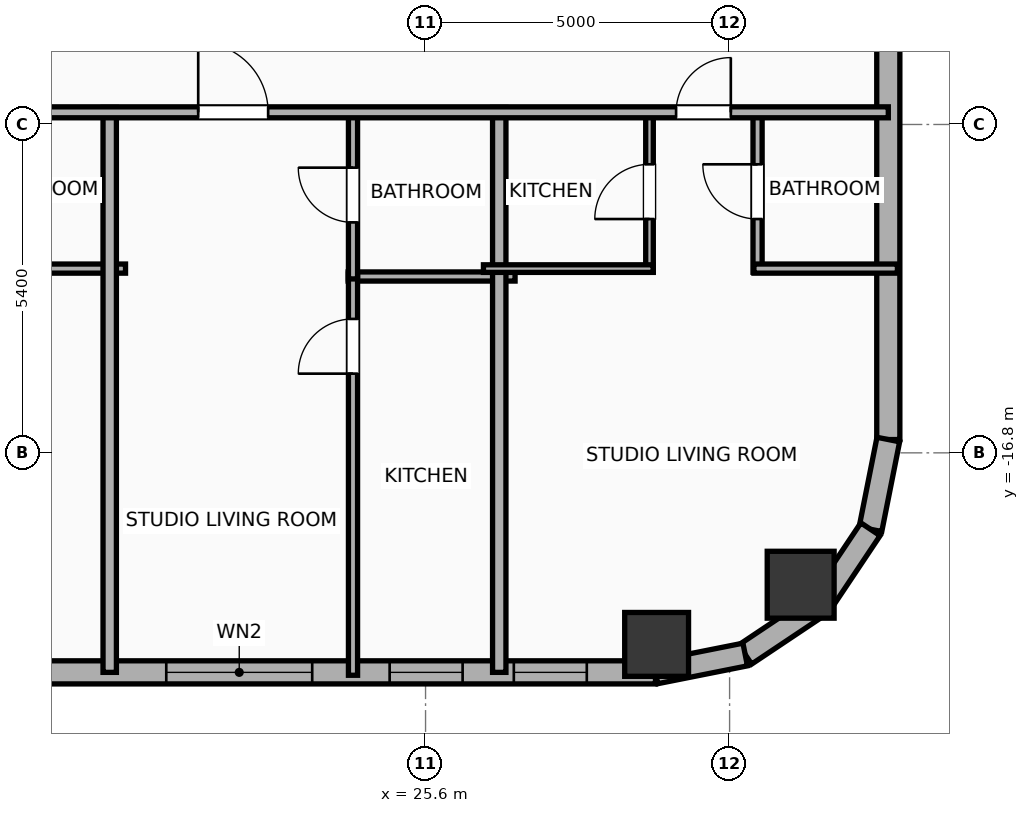
"""IFC4 building model, lengths in metres.
Left out: names, types, materials, properties, quantities, classifications, styles, units other than length and angle.
Written with IfcOpenShell. Run it as: python <this file> out.ifc"""

import sys

from ifc_helpers import new_model, si_unit, direction, frame, frame_2d, origin, origin_2d, place, context, subcontext, project, spatial, rectangle, hollow_rectangle, hollow_circle, extrude, element, fill, save


model = new_model("IFC4")
c1 = context("Model", 3, precision=1e-05, world=origin(), true_north=direction((0.0, 1.0)))
c2 = subcontext(c1, "Body", "Model", "MODEL_VIEW")
j1 = project(units=[si_unit("LENGTHUNIT", "METRE"), si_unit("PLANEANGLEUNIT", "RADIAN")], contexts=[c1])
p1 = place(None, origin())
s1 = spatial("IfcSite", under=j1, at=p1, CompositionType="ELEMENT")
p2 = place(p1, origin())
s2 = spatial("IfcBuilding", under=s1, at=p2, CompositionType="ELEMENT")
p3 = place(p2, frame((0.0, 0.0, 120.9)))
s3 = spatial("IfcBuildingStorey", under=s2, at=p3, CompositionType="ELEMENT", Elevation=120.9)
p4 = place(p3, frame((29.4, -19.95, 0.0), z_axis=(0.0, 0.0, 1.0), x_axis=(1.0, 0.0, 0.0)))
e1 = element("IfcColumn", 1, at=p4, inside=s3, PredefinedType="COLUMN", context=c2, shape_type="SweptSolid", body=[
    extrude(hollow_rectangle(XDim=1.05, YDim=1.05, WallThickness=0.036, at=origin_2d()), origin(), (0.0, 0.0, 1.0), 3.9),
])
p5 = place(p3, frame((31.769, -18.969, 0.0), z_axis=(0.0, 0.0, 1.0), x_axis=(1.0, 0.0, 0.0)))
e2 = element("IfcColumn", 2, at=p5, inside=s3, PredefinedType="COLUMN", context=c2, shape_type="SweptSolid", body=[
    extrude(hollow_circle(Radius=0.55, WallThickness=0.036, at=origin_2d()), origin(), (0.0, 0.0, 1.0), 3.9),
])
p6 = place(p3, frame((29.381, -20.41, 0.0), z_axis=(0.0, 0.0, 1.0), x_axis=(-1.0, 0.0, 0.0)))
e3 = element("IfcWall", 3, at=p6, inside=s3, PredefinedType="ELEMENTEDWALL", context=c2, shape_type="SweptSolid", body=[
    extrude(rectangle(XDim=54.763, YDim=0.38, at=frame_2d((27.381, 0.0))), origin(), (0.0, 0.0, 1.0), 3.65),
])
p7 = place(p6, frame((5.645, 0.0, 0.75)))
e4 = element("IfcOpeningElement", 4, at=p7, cuts=e3, PredefinedType="OPENING", context=c2, shape_type="SweptSolid", body=[
    extrude(rectangle(XDim=2.4, YDim=2.1, at=frame_2d((1.2, 1.05))), frame((0.0, 0.2, 0.0), z_axis=(0.0, -1.0, 0.0), x_axis=(1.0, 0.0, 0.0)), (0.0, 0.0, 1.0), 0.4),
])
p8 = place(p6, frame((47.567, 0.0, 0.75)))
e5 = element("IfcOpeningElement", 5, at=p8, cuts=e3, PredefinedType="OPENING", context=c2, shape_type="SweptSolid", body=[
    extrude(rectangle(XDim=2.4, YDim=2.1, at=frame_2d((1.2, 1.05))), frame((0.0, 0.2, 0.0), z_axis=(0.0, -1.0, 0.0), x_axis=(1.0, 0.0, 0.0)), (0.0, 0.0, 1.0), 0.4),
])
p9 = place(p6, frame((51.831, 0.0, 0.75)))
e6 = element("IfcOpeningElement", 6, at=p9, cuts=e3, PredefinedType="OPENING", context=c2, shape_type="SweptSolid", body=[
    extrude(rectangle(XDim=1.2, YDim=2.05, at=frame_2d((0.6, 1.025))), frame((0.0, 0.2, 0.0), z_axis=(0.0, -1.0, 0.0), x_axis=(1.0, 0.0, 0.0)), (0.0, 0.0, 1.0), 0.4),
])
p10 = place(p6, frame((44.606, 0.0, 0.75)))
e7 = element("IfcOpeningElement", 7, at=p10, cuts=e3, PredefinedType="OPENING", context=c2, shape_type="SweptSolid", body=[
    extrude(rectangle(XDim=1.2, YDim=2.05, at=frame_2d((0.6, 1.025))), frame((0.0, 0.2, 0.0), z_axis=(0.0, -1.0, 0.0), x_axis=(1.0, 0.0, 0.0)), (0.0, 0.0, 1.0), 0.4),
])
p11 = place(p6, frame((40.986, 0.0, 0.75)))
e8 = element("IfcOpeningElement", 8, at=p11, cuts=e3, PredefinedType="OPENING", context=c2, shape_type="SweptSolid", body=[
    extrude(rectangle(XDim=1.2, YDim=2.05, at=frame_2d((0.6, 1.025))), frame((0.0, 0.2, 0.0), z_axis=(0.0, -1.0, 0.0), x_axis=(1.0, 0.0, 0.0)), (0.0, 0.0, 1.0), 0.4),
])
p12 = place(p6, frame((37.486, 0.0, 0.75)))
e9 = element("IfcOpeningElement", 9, at=p12, cuts=e3, PredefinedType="OPENING", context=c2, shape_type="SweptSolid", body=[
    extrude(rectangle(XDim=1.2, YDim=2.05, at=frame_2d((0.6, 1.025))), frame((0.0, 0.2, 0.0), z_axis=(0.0, -1.0, 0.0), x_axis=(1.0, 0.0, 0.0)), (0.0, 0.0, 1.0), 0.4),
])
p13 = place(p6, frame((33.986, 0.0, 0.75)))
e10 = element("IfcOpeningElement", 10, at=p13, cuts=e3, PredefinedType="OPENING", context=c2, shape_type="SweptSolid", body=[
    extrude(rectangle(XDim=1.2, YDim=2.05, at=frame_2d((0.6, 1.025))), frame((0.0, 0.2, 0.0), z_axis=(0.0, -1.0, 0.0), x_axis=(1.0, 0.0, 0.0)), (0.0, 0.0, 1.0), 0.4),
])
p14 = place(p6, frame((30.486, 0.0, 0.75)))
e11 = element("IfcOpeningElement", 11, at=p14, cuts=e3, PredefinedType="OPENING", context=c2, shape_type="SweptSolid", body=[
    extrude(rectangle(XDim=1.2, YDim=2.05, at=frame_2d((0.6, 1.025))), frame((0.0, 0.2, 0.0), z_axis=(0.0, -1.0, 0.0), x_axis=(1.0, 0.0, 0.0)), (0.0, 0.0, 1.0), 0.4),
])
p15 = place(p6, frame((26.986, 0.0, 0.75)))
e12 = element("IfcOpeningElement", 12, at=p15, cuts=e3, PredefinedType="OPENING", context=c2, shape_type="SweptSolid", body=[
    extrude(rectangle(XDim=1.2, YDim=2.05, at=frame_2d((0.6, 1.025))), frame((0.0, 0.2, 0.0), z_axis=(0.0, -1.0, 0.0), x_axis=(1.0, 0.0, 0.0)), (0.0, 0.0, 1.0), 0.4),
])
p16 = place(p6, frame((23.486, 0.0, 0.75)))
e13 = element("IfcOpeningElement", 13, at=p16, cuts=e3, PredefinedType="OPENING", context=c2, shape_type="SweptSolid", body=[
    extrude(rectangle(XDim=1.2, YDim=2.05, at=frame_2d((0.6, 1.025))), frame((0.0, 0.2, 0.0), z_axis=(0.0, -1.0, 0.0), x_axis=(1.0, 0.0, 0.0)), (0.0, 0.0, 1.0), 0.4),
])
p17 = place(p6, frame((19.986, 0.0, 0.75)))
e14 = element("IfcOpeningElement", 14, at=p17, cuts=e3, PredefinedType="OPENING", context=c2, shape_type="SweptSolid", body=[
    extrude(rectangle(XDim=1.2, YDim=2.05, at=frame_2d((0.6, 1.025))), frame((0.0, 0.2, 0.0), z_axis=(0.0, -1.0, 0.0), x_axis=(1.0, 0.0, 0.0)), (0.0, 0.0, 1.0), 0.4),
])
p18 = place(p6, frame((16.486, 0.0, 0.75)))
e15 = element("IfcOpeningElement", 15, at=p18, cuts=e3, PredefinedType="OPENING", context=c2, shape_type="SweptSolid", body=[
    extrude(rectangle(XDim=1.2, YDim=2.05, at=frame_2d((0.6, 1.025))), frame((0.0, 0.2, 0.0), z_axis=(0.0, -1.0, 0.0), x_axis=(1.0, 0.0, 0.0)), (0.0, 0.0, 1.0), 0.4),
])
p19 = place(p6, frame((11.698, 0.0, 0.75)))
e16 = element("IfcOpeningElement", 16, at=p19, cuts=e3, PredefinedType="OPENING", context=c2, shape_type="SweptSolid", body=[
    extrude(rectangle(XDim=1.2, YDim=2.05, at=frame_2d((0.6, 1.025))), frame((0.0, 0.2, 0.0), z_axis=(0.0, -1.0, 0.0), x_axis=(1.0, 0.0, 0.0)), (0.0, 0.0, 1.0), 0.4),
])
p20 = place(p6, frame((3.172, 0.0, 0.75)))
e17 = element("IfcOpeningElement", 17, at=p20, cuts=e3, PredefinedType="OPENING", context=c2, shape_type="SweptSolid", body=[
    extrude(rectangle(XDim=1.2, YDim=2.05, at=frame_2d((0.6, 1.025))), frame((0.0, 0.2, 0.0), z_axis=(0.0, -1.0, 0.0), x_axis=(1.0, 0.0, 0.0)), (0.0, 0.0, 1.0), 0.4),
])
p21 = place(p6, frame((1.13, 0.0, 0.75)))
e18 = element("IfcOpeningElement", 18, at=p21, cuts=e3, PredefinedType="OPENING", context=c2, shape_type="SweptSolid", body=[
    extrude(rectangle(XDim=1.2, YDim=2.05, at=frame_2d((0.6, 1.025))), frame((0.0, 0.2, 0.0), z_axis=(0.0, -1.0, 0.0), x_axis=(1.0, 0.0, 0.0)), (0.0, 0.0, 1.0), 0.4),
])
p22 = place(p3, frame((33.21, 17.781, 0.0), z_axis=(0.0, 0.0, 1.0), x_axis=(0.0, -1.0, 0.0)))
e19 = element("IfcWall", 19, at=p22, inside=s3, PredefinedType="ELEMENTEDWALL", context=c2, shape_type="SweptSolid", body=[
    extrude(rectangle(XDim=34.363, YDim=0.38, at=frame_2d((17.181, 0.0))), origin(), (0.0, 0.0, 1.0), 3.65),
])
p23 = place(p22, frame((12.286, 0.0, 0.75)))
e20 = element("IfcOpeningElement", 20, at=p23, cuts=e19, PredefinedType="OPENING", context=c2, shape_type="SweptSolid", body=[
    extrude(rectangle(XDim=1.2, YDim=2.05, at=frame_2d((0.6, 1.025))), frame((0.0, 0.2, 0.0), z_axis=(0.0, -1.0, 0.0), x_axis=(1.0, 0.0, 0.0)), (0.0, 0.0, 1.0), 0.4),
])
p24 = place(p22, frame((21.936, 0.0, 0.75)))
e21 = element("IfcOpeningElement", 21, at=p24, cuts=e19, PredefinedType="OPENING", context=c2, shape_type="SweptSolid", body=[
    extrude(rectangle(XDim=1.2, YDim=2.05, at=frame_2d((0.6, 1.025))), frame((0.0, 0.2, 0.0), z_axis=(0.0, -1.0, 0.0), x_axis=(1.0, 0.0, 0.0)), (0.0, 0.0, 1.0), 0.4),
])
p25 = place(p3, frame((33.21, -16.581, 0.0), z_axis=(0.0, 0.0, 1.0), x_axis=(-0.195086038585, -0.980786132421, 0.0)))
e22 = element("IfcWall", 22, at=p25, inside=s3, PredefinedType="ELEMENTEDWALL", context=c2, shape_type="SweptSolid", body=[
    extrude(rectangle(XDim=1.504, YDim=0.38, at=frame_2d((0.752, 0.0))), origin(), (0.0, 0.0, 1.0), 3.65),
])
p26 = place(p3, frame((32.917, -18.057, 0.0), z_axis=(0.0, 0.0, 1.0), x_axis=(-0.555610286119, -0.831442848281, 0.0)))
e23 = element("IfcWall", 23, at=p26, inside=s3, PredefinedType="ELEMENTEDWALL", context=c2, shape_type="SweptSolid", body=[
    extrude(rectangle(XDim=1.485, YDim=0.38, at=frame_2d((0.743, 0.0))), origin(), (0.0, 0.0, 1.0), 3.65),
])
p27 = place(p3, frame((32.091, -19.292, 0.0), z_axis=(0.0, 0.0, 1.0), x_axis=(-0.831468045563, -0.555572577804, 0.0)))
e24 = element("IfcWall", 24, at=p27, inside=s3, PredefinedType="ELEMENTEDWALL", context=c2, shape_type="SweptSolid", body=[
    extrude(rectangle(XDim=1.485, YDim=0.38, at=frame_2d((0.742, 0.0))), origin(), (0.0, 0.0, 1.0), 3.65),
])
p28 = place(p3, frame((30.857, -20.116, 0.0), z_axis=(0.0, 0.0, 1.0), x_axis=(-0.980786132421, -0.195086038585, 0.0)))
e25 = element("IfcWall", 25, at=p28, inside=s3, PredefinedType="ELEMENTEDWALL", context=c2, shape_type="SweptSolid", body=[
    extrude(rectangle(XDim=1.504, YDim=0.38, at=frame_2d((0.752, 0.0))), origin(), (0.0, 0.0, 1.0), 3.65),
])
p29 = place(p3, frame((18.149, -13.77, 0.0), z_axis=(0.0, 0.0, 1.0), x_axis=(1.0, 0.0, 0.0)))
e26 = element("IfcWall", 26, at=p29, inside=s3, PredefinedType="PLUMBINGWALL", context=c2, shape_type="SweptSolid", body=[
    extrude(rectangle(XDim=2.517, YDim=0.15, at=frame_2d((1.259, 0.0))), origin(), (0.0, 0.0, 1.0), 3.65),
])
p30 = place(p3, frame((20.406, -20.41, 0.0), z_axis=(0.0, 0.0, 1.0), x_axis=(0.0, 1.0, 0.0)))
e27 = element("IfcWall", 27, at=p30, inside=s3, PredefinedType="PARTITIONING", context=c2, shape_type="SweptSolid", body=[
    extrude(rectangle(XDim=9.29, YDim=0.22, at=frame_2d((4.645, 0.0))), origin(), (0.0, 0.0, 1.0), 3.65),
])
p31 = place(p3, frame((24.327, -13.9, 0.0), z_axis=(0.0, 0.0, 1.0), x_axis=(1.0, 0.0, 0.0)))
e28 = element("IfcWall", 28, at=p31, inside=s3, PredefinedType="PLUMBINGWALL", context=c2, shape_type="SweptSolid", body=[
    extrude(rectangle(XDim=2.745, YDim=0.15, at=frame_2d((1.373, 0.0))), origin(), (0.0, 0.0, 1.0), 3.65),
])
p32 = place(p3, frame((24.407, -20.458, 0.0), z_axis=(0.0, 0.0, 1.0), x_axis=(0.0, 1.0, 0.0)))
e29 = element("IfcWall", 29, at=p32, inside=s3, PredefinedType="PLUMBINGWALL", context=c2, shape_type="SweptSolid", body=[
    extrude(rectangle(XDim=6.597, YDim=0.15, at=frame_2d((3.299, 0.0))), origin(), (0.0, 0.0, 1.0), 3.65),
])
p33 = place(p32, frame((4.96, 0.0, 0.0)))
e30 = element("IfcOpeningElement", 30, at=p33, cuts=e29, PredefinedType="OPENING", context=c2, shape_type="SweptSolid", body=[
    extrude(rectangle(XDim=0.9, YDim=2.05, at=frame_2d((0.45, 1.025))), frame((0.0, 0.085, 0.0), z_axis=(0.0, -1.0, 0.0), x_axis=(1.0, 0.0, 0.0)), (0.0, 0.0, 1.0), 0.17),
])
p34 = place(p3, frame((24.407, -13.94, 0.0), z_axis=(0.0, 0.0, 1.0), x_axis=(0.0, 1.0, 0.0)))
e31 = element("IfcWall", 31, at=p34, inside=s3, PredefinedType="PLUMBINGWALL", context=c2, shape_type="SweptSolid", body=[
    extrude(rectangle(XDim=2.76, YDim=0.15, at=frame_2d((1.38, 0.0))), origin(), (0.0, 0.0, 1.0), 3.65),
])
p35 = place(p34, frame((0.93, 0.0, 0.0)))
e32 = element("IfcOpeningElement", 32, at=p35, cuts=e31, PredefinedType="OPENING", context=c2, shape_type="SweptSolid", body=[
    extrude(rectangle(XDim=0.9, YDim=2.05, at=frame_2d((0.45, 1.025))), frame((0.0, 0.085, 0.0), z_axis=(0.0, -1.0, 0.0), x_axis=(1.0, 0.0, 0.0)), (0.0, 0.0, 1.0), 0.17),
])
p36 = place(p3, frame((26.812, -20.41, 0.0), z_axis=(0.0, 0.0, 1.0), x_axis=(0.0, 1.0, 0.0)))
e33 = element("IfcWall", 33, at=p36, inside=s3, PredefinedType="PARTITIONING", context=c2, shape_type="SweptSolid", body=[
    extrude(rectangle(XDim=9.29, YDim=0.22, at=frame_2d((4.645, 0.0))), origin(), (0.0, 0.0, 1.0), 3.65),
])
p37 = place(p3, frame((29.283, -13.83, 0.0), z_axis=(0.0, 0.0, 1.0), x_axis=(0.0, 1.0, 0.0)))
e34 = element("IfcWall", 34, at=p37, inside=s3, PredefinedType="PARTITIONING", context=c2, shape_type="SweptSolid", body=[
    extrude(rectangle(XDim=2.65, YDim=0.125, at=frame_2d((1.325, 0.0))), origin(), (0.0, 0.0, 1.0), 3.65),
])
p38 = place(p37, frame((0.875, 0.0, 0.0)))
e35 = element("IfcOpeningElement", 35, at=p38, cuts=e34, PredefinedType="OPENING", context=c2, shape_type="SweptSolid", body=[
    extrude(rectangle(XDim=0.9, YDim=2.05, at=frame_2d((0.45, 1.025))), frame((0.0, 0.073, 0.0), z_axis=(0.0, -1.0, 0.0), x_axis=(1.0, 0.0, 0.0)), (0.0, 0.0, 1.0), 0.145),
])
p39 = place(p3, frame((31.06, -13.83, 0.0), z_axis=(0.0, 0.0, 1.0), x_axis=(0.0, 1.0, 0.0)))
e36 = element("IfcWall", 36, at=p39, inside=s3, PredefinedType="PLUMBINGWALL", context=c2, shape_type="SweptSolid", body=[
    extrude(rectangle(XDim=2.65, YDim=0.15, at=frame_2d((1.325, 0.0))), origin(), (0.0, 0.0, 1.0), 3.65),
])
p40 = place(p39, frame((0.875, 0.0, 0.0)))
e37 = element("IfcOpeningElement", 37, at=p40, cuts=e36, PredefinedType="OPENING", context=c2, shape_type="SweptSolid", body=[
    extrude(rectangle(XDim=0.9, YDim=2.05, at=frame_2d((0.45, 1.025))), frame((0.0, 0.085, 0.0), z_axis=(0.0, -1.0, 0.0), x_axis=(1.0, 0.0, 0.0)), (0.0, 0.0, 1.0), 0.17),
])
p41 = place(p3, frame((26.552, -13.77, 0.0), z_axis=(0.0, 0.0, 1.0), x_axis=(1.0, 0.0, 0.0)))
e38 = element("IfcWall", 38, at=p41, inside=s3, PredefinedType="PARTITIONING", context=c2, shape_type="SweptSolid", body=[
    extrude(rectangle(XDim=2.791, YDim=0.125, at=frame_2d((1.396, 0.0))), origin(), (0.0, 0.0, 1.0), 3.65),
])
p42 = place(p3, frame((31.0, -13.77, 0.0), z_axis=(0.0, 0.0, 1.0), x_axis=(1.0, 0.0, 0.0)))
e39 = element("IfcWall", 39, at=p42, inside=s3, PredefinedType="PLUMBINGWALL", context=c2, shape_type="SweptSolid", body=[
    extrude(rectangle(XDim=2.36, YDim=0.15, at=frame_2d((1.18, 0.0))), origin(), (0.0, 0.0, 1.0), 3.65),
])
p43 = place(p3, frame((-29.21, -11.2, 0.0), z_axis=(0.0, 0.0, 1.0), x_axis=(1.0, 0.0, 0.0)))
e40 = element("IfcWall", 40, at=p43, inside=s3, PredefinedType="PARTITIONING", context=c2, shape_type="SweptSolid", body=[
    extrude(rectangle(XDim=62.42, YDim=0.18, at=frame_2d((31.21, 0.0))), origin(), (0.0, 0.0, 1.0), 3.65),
])
p44 = place(p43, frame((3.357, 0.0, 0.0)))
e41 = element("IfcOpeningElement", 41, at=p44, cuts=e40, PredefinedType="OPENING", context=c2, shape_type="SweptSolid", body=[
    extrude(rectangle(XDim=1.15, YDim=2.05, at=frame_2d((0.575, 1.025))), frame((0.0, 0.1, 0.0), z_axis=(0.0, -1.0, 0.0), x_axis=(1.0, 0.0, 0.0)), (0.0, 0.0, 1.0), 0.2),
])
p45 = place(p43, frame((10.998, 0.0, 0.0)))
e42 = element("IfcOpeningElement", 42, at=p45, cuts=e40, PredefinedType="OPENING", context=c2, shape_type="SweptSolid", body=[
    extrude(rectangle(XDim=1.15, YDim=2.05, at=frame_2d((0.575, 1.025))), frame((0.0, 0.1, 0.0), z_axis=(0.0, -1.0, 0.0), x_axis=(1.0, 0.0, 0.0)), (0.0, 0.0, 1.0), 0.2),
])
p46 = place(p43, frame((18.426, 0.0, 0.0)))
e43 = element("IfcOpeningElement", 43, at=p46, cuts=e40, PredefinedType="OPENING", context=c2, shape_type="SweptSolid", body=[
    extrude(rectangle(XDim=0.9, YDim=2.05, at=frame_2d((0.45, 1.025))), frame((0.0, 0.1, 0.0), z_axis=(0.0, -1.0, 0.0), x_axis=(1.0, 0.0, 0.0)), (0.0, 0.0, 1.0), 0.2),
])
p47 = place(p43, frame((25.423, 0.0, 0.0)))
e44 = element("IfcOpeningElement", 44, at=p47, cuts=e40, PredefinedType="OPENING", context=c2, shape_type="SweptSolid", body=[
    extrude(rectangle(XDim=0.9, YDim=2.05, at=frame_2d((0.45, 1.025))), frame((0.0, 0.1, 0.0), z_axis=(0.0, -1.0, 0.0), x_axis=(1.0, 0.0, 0.0)), (0.0, 0.0, 1.0), 0.2),
])
p48 = place(p43, frame((32.427, 0.0, 0.0)))
e45 = element("IfcOpeningElement", 45, at=p48, cuts=e40, PredefinedType="OPENING", context=c2, shape_type="SweptSolid", body=[
    extrude(rectangle(XDim=0.9, YDim=2.05, at=frame_2d((0.45, 1.025))), frame((0.0, 0.1, 0.0), z_axis=(0.0, -1.0, 0.0), x_axis=(1.0, 0.0, 0.0)), (0.0, 0.0, 1.0), 0.2),
])
p49 = place(p43, frame((39.424, 0.0, 0.0)))
e46 = element("IfcOpeningElement", 46, at=p49, cuts=e40, PredefinedType="OPENING", context=c2, shape_type="SweptSolid", body=[
    extrude(rectangle(XDim=0.9, YDim=2.05, at=frame_2d((0.45, 1.025))), frame((0.0, 0.1, 0.0), z_axis=(0.0, -1.0, 0.0), x_axis=(1.0, 0.0, 0.0)), (0.0, 0.0, 1.0), 0.2),
])
p50 = place(p43, frame((46.09, 0.0, 0.0)))
e47 = element("IfcOpeningElement", 47, at=p50, cuts=e40, PredefinedType="OPENING", context=c2, shape_type="SweptSolid", body=[
    extrude(rectangle(XDim=0.9, YDim=2.05, at=frame_2d((0.45, 1.025))), frame((0.0, 0.1, 0.0), z_axis=(0.0, -1.0, 0.0), x_axis=(1.0, 0.0, 0.0)), (0.0, 0.0, 1.0), 0.2),
])
p51 = place(p43, frame((51.071, 0.0, 0.0)))
e48 = element("IfcOpeningElement", 48, at=p51, cuts=e40, PredefinedType="OPENING", context=c2, shape_type="SweptSolid", body=[
    extrude(rectangle(XDim=1.15, YDim=2.05, at=frame_2d((0.575, 1.025))), frame((0.0, 0.1, 0.0), z_axis=(0.0, -1.0, 0.0), x_axis=(1.0, 0.0, 0.0)), (0.0, 0.0, 1.0), 0.2),
])
p52 = place(p43, frame((58.93, 0.0, 0.0)))
e49 = element("IfcOpeningElement", 49, at=p52, cuts=e40, PredefinedType="OPENING", context=c2, shape_type="SweptSolid", body=[
    extrude(rectangle(XDim=0.9, YDim=2.05, at=frame_2d((0.45, 1.025))), frame((0.0, 0.1, 0.0), z_axis=(0.0, -1.0, 0.0), x_axis=(1.0, 0.0, 0.0)), (0.0, 0.0, 1.0), 0.2),
])
p53 = place(p7, origin())
e50 = element("IfcWindow", 50, at=p53, inside=s3, PartitioningType="SINGLE_PANEL", PredefinedType="WINDOW", context=c2, shape_type="SweptSolid", body=[
    extrude(rectangle(XDim=2.4, YDim=2.1, at=frame_2d((1.2, 1.05))), frame((0.0, 0.03, 0.0), z_axis=(0.0, -1.0, 0.0), x_axis=(1.0, 0.0, 0.0)), (0.0, 0.0, 1.0), 0.06),
])
fill(e4, e50)
p54 = place(p20, origin())
e51 = element("IfcWindow", 51, at=p54, inside=s3, PartitioningType="SINGLE_PANEL", PredefinedType="WINDOW", context=c2, shape_type="SweptSolid", body=[
    extrude(rectangle(XDim=1.2, YDim=2.05, at=frame_2d((0.6, 1.025))), frame((0.0, 0.03, 0.0), z_axis=(0.0, -1.0, 0.0), x_axis=(1.0, 0.0, 0.0)), (0.0, 0.0, 1.0), 0.06),
])
fill(e17, e51)
p55 = place(p21, origin())
e52 = element("IfcWindow", 52, at=p55, inside=s3, PartitioningType="SINGLE_PANEL", PredefinedType="WINDOW", context=c2, shape_type="SweptSolid", body=[
    extrude(rectangle(XDim=1.2, YDim=2.05, at=frame_2d((0.6, 1.025))), frame((0.0, 0.03, 0.0), z_axis=(0.0, -1.0, 0.0), x_axis=(1.0, 0.0, 0.0)), (0.0, 0.0, 1.0), 0.06),
])
fill(e18, e52)
p56 = place(p33, origin())
e53 = element("IfcDoor", 53, at=p56, inside=s3, OperationType="SINGLE_SWING_LEFT", PredefinedType="DOOR", context=c2, shape_type="SweptSolid", body=[
    extrude(rectangle(XDim=0.9, YDim=2.05, at=frame_2d((0.45, 1.025))), frame((0.0, 0.025, 0.0), z_axis=(0.0, -1.0, 0.0), x_axis=(1.0, 0.0, 0.0)), (0.0, 0.0, 1.0), 0.05),
])
fill(e30, e53)
p57 = place(p35, origin())
e54 = element("IfcDoor", 54, at=p57, inside=s3, OperationType="SINGLE_SWING_RIGHT", PredefinedType="DOOR", context=c2, shape_type="SweptSolid", body=[
    extrude(rectangle(XDim=0.9, YDim=2.05, at=frame_2d((0.45, 1.025))), frame((0.0, 0.025, 0.0), z_axis=(0.0, -1.0, 0.0), x_axis=(1.0, 0.0, 0.0)), (0.0, 0.0, 1.0), 0.05),
])
fill(e32, e54)
p58 = place(p38, origin())
e55 = element("IfcDoor", 55, at=p58, inside=s3, OperationType="SINGLE_SWING_LEFT", PredefinedType="DOOR", context=c2, shape_type="SweptSolid", body=[
    extrude(rectangle(XDim=0.9, YDim=2.05, at=frame_2d((0.45, 1.025))), frame((0.0, 0.025, 0.0), z_axis=(0.0, -1.0, 0.0), x_axis=(1.0, 0.0, 0.0)), (0.0, 0.0, 1.0), 0.05),
])
fill(e35, e55)
p59 = place(p40, origin())
e56 = element("IfcDoor", 56, at=p59, inside=s3, OperationType="SINGLE_SWING_RIGHT", PredefinedType="DOOR", context=c2, shape_type="SweptSolid", body=[
    extrude(rectangle(XDim=0.9, YDim=2.05, at=frame_2d((0.45, 1.025))), frame((0.0, 0.025, 0.0), z_axis=(0.0, -1.0, 0.0), x_axis=(1.0, 0.0, 0.0)), (0.0, 0.0, 1.0), 0.05),
])
fill(e37, e56)
p60 = place(p51, origin())
e57 = element("IfcDoor", 57, at=p60, inside=s3, OperationType="SINGLE_SWING_LEFT", PredefinedType="DOOR", context=c2, shape_type="SweptSolid", body=[
    extrude(rectangle(XDim=1.15, YDim=2.05, at=frame_2d((0.575, 1.025))), frame((0.0, 0.025, 0.0), z_axis=(0.0, -1.0, 0.0), x_axis=(1.0, 0.0, 0.0)), (0.0, 0.0, 1.0), 0.05),
])
fill(e48, e57)
p61 = place(p52, origin())
e58 = element("IfcDoor", 58, at=p61, inside=s3, OperationType="SINGLE_SWING_RIGHT", PredefinedType="DOOR", context=c2, shape_type="SweptSolid", body=[
    extrude(rectangle(XDim=0.9, YDim=2.05, at=frame_2d((0.45, 1.025))), frame((0.0, 0.025, 0.0), z_axis=(0.0, -1.0, 0.0), x_axis=(1.0, 0.0, 0.0)), (0.0, 0.0, 1.0), 0.05),
])
fill(e49, e58)
save(model, sys.argv[1])
